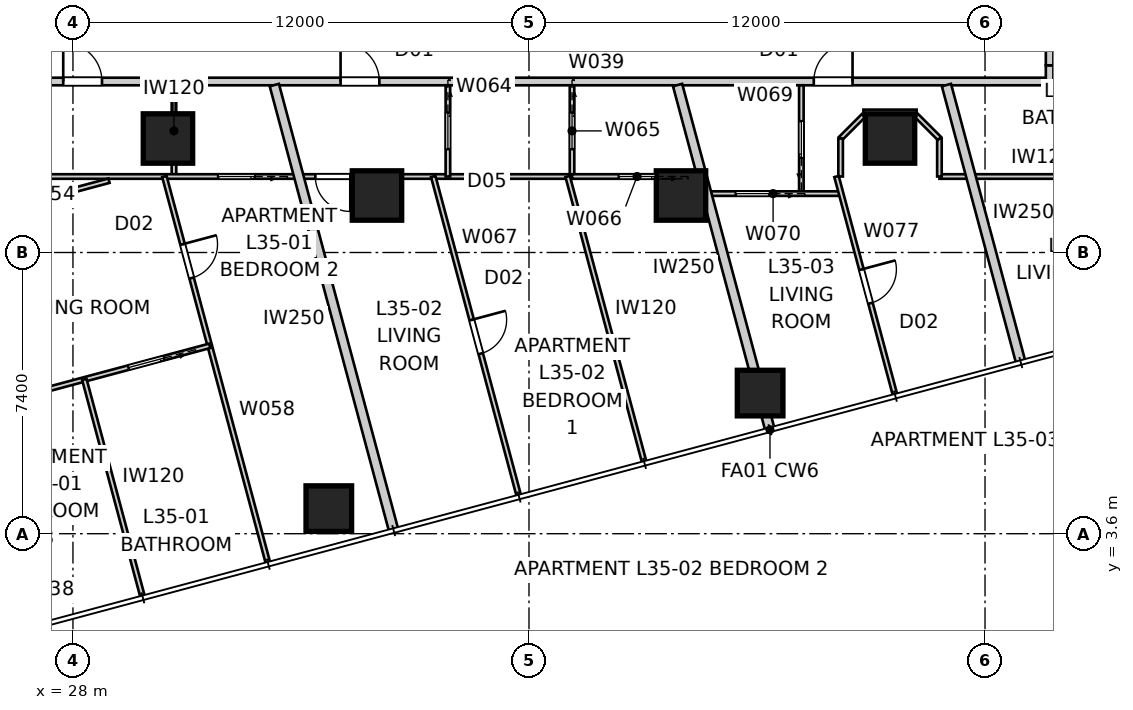
"""IFC4 building model, lengths in metres.
Left out: names, types, materials, properties, quantities, classifications, styles, units other than length and angle.
Written with IfcOpenShell. Run it as: python <this file> out.ifc"""

import sys

from ifc_helpers import new_model, si_unit, direction, frame, frame_2d, origin, origin_2d, place, context, subcontext, project, spatial, rectangle, extrude, element, fill, save


model = new_model("IFC4")
c1 = context("Model", 3, precision=1e-05, world=origin(), true_north=direction((0.0, 1.0)))
c2 = subcontext(c1, "Body", "Model", "MODEL_VIEW")
j1 = project(units=[si_unit("LENGTHUNIT", "METRE"), si_unit("PLANEANGLEUNIT", "RADIAN")], contexts=[c1])
p1 = place(None, origin())
s1 = spatial("IfcSite", under=j1, at=p1, CompositionType="ELEMENT")
p2 = place(p1, origin())
s2 = spatial("IfcBuilding", under=s1, at=p2, CompositionType="ELEMENT")
p3 = place(p2, frame((0.0, 0.0, 128.6)))
s3 = spatial("IfcBuildingStorey", under=s2, at=p3, CompositionType="ELEMENT", Elevation=128.6)
for number, where, z_axis, x_axis in (
    (1, (34.733, 4.26, 0.0), (0.0, 0.0, 1.0), (1.0, 0.0, 0.0)),
    (2, (46.082, 7.301, 0.0), (0.0, 0.0, 1.0), (1.0, 0.0, 0.0)),
):
    element("IfcColumn", number, at=place(p3, frame(where, z_axis=z_axis, x_axis=x_axis)), inside=s3, PredefinedType="COLUMN", context=c2, shape_type="SweptSolid", body=[
        extrude(rectangle(XDim=1.2, YDim=1.2, at=origin_2d()), origin(), (0.0, 0.0, 1.0), 3.4),
    ])
for number, where, z_axis, x_axis in (
    (3, (30.5, 14.0, 0.0), (0.0, 0.0, 1.0), (1.0, 0.0, 0.0)),
    (4, (36.0, 12.5, 0.0), (0.0, 0.0, 1.0), (1.0, 0.0, 0.0)),
    (5, (44.0, 12.5, 0.0), (0.0, 0.0, 1.0), (1.0, 0.0, 0.0)),
    (6, (49.5, 14.0, 0.0), (0.0, 0.0, 1.0), (1.0, 0.0, 0.0)),
):
    element("IfcColumn", number, at=place(p3, frame(where, z_axis=z_axis, x_axis=x_axis)), inside=s3, PredefinedType="COLUMN", context=c2, shape_type="SweptSolid", body=[
        extrude(rectangle(XDim=1.3, YDim=1.3, at=origin_2d()), origin(), (0.0, 0.0, 1.0), 3.4),
    ])
p4 = place(p3, frame((25.5, 15.5, 0.0), z_axis=(0.0, 0.0, 1.0), x_axis=(1.0, 0.0, 0.0)))
e7 = element("IfcWall", 7, at=p4, inside=s3, PredefinedType="PARTITIONING", context=c2, shape_type="SweptSolid", body=[
    extrude(rectangle(XDim=28.2, YDim=0.2, at=frame_2d((14.1, 0.0))), origin(), (0.0, 0.0, 1.0), 3.25),
])
p5 = place(p4, frame((2.244, 0.0, 0.0)))
e8 = element("IfcOpeningElement", 8, at=p5, cuts=e7, PredefinedType="OPENING", context=c2, shape_type="SweptSolid", body=[
    extrude(rectangle(XDim=1.02, YDim=2.1, at=frame_2d((0.51, 1.05))), frame((0.0, 0.11, 0.0), z_axis=(0.0, -1.0, 0.0), x_axis=(1.0, 0.0, 0.0)), (0.0, 0.0, 1.0), 0.22),
])
p6 = place(p4, frame((9.542, 0.0, 0.0)))
e9 = element("IfcOpeningElement", 9, at=p6, cuts=e7, PredefinedType="OPENING", context=c2, shape_type="SweptSolid", body=[
    extrude(rectangle(XDim=1.02, YDim=2.34, at=frame_2d((0.51, 1.17))), frame((0.0, 0.11, 0.0), z_axis=(0.0, -1.0, 0.0), x_axis=(1.0, 0.0, 0.0)), (0.0, 0.0, 1.0), 0.22),
])
p7 = place(p4, frame((21.994, 0.0, 0.0)))
e10 = element("IfcOpeningElement", 10, at=p7, cuts=e7, PredefinedType="OPENING", context=c2, shape_type="SweptSolid", body=[
    extrude(rectangle(XDim=1.02, YDim=2.34, at=frame_2d((0.51, 1.17))), frame((0.0, 0.11, 0.0), z_axis=(0.0, -1.0, 0.0), x_axis=(1.0, 0.0, 0.0)), (0.0, 0.0, 1.0), 0.22),
])
p8 = place(p3, frame((53.7, 15.5, 0.0), z_axis=(0.0, 0.0, 1.0), x_axis=(0.0, 1.0, 0.0)))
e11 = element("IfcWall", 11, at=p8, inside=s3, PredefinedType="PARTITIONING", context=c2, shape_type="SweptSolid", body=[
    extrude(rectangle(XDim=0.426, YDim=0.2, at=frame_2d((0.213, 0.0))), origin(), (0.0, 0.0, 1.0), 3.25),
])
p9 = place(p3, frame((53.7, 15.926, 0.0), z_axis=(0.0, 0.0, 1.0), x_axis=(0.0, 1.0, 0.0)))
e12 = element("IfcWall", 12, at=p9, inside=s3, PredefinedType="PARTITIONING", context=c2, shape_type="SweptSolid", body=[
    extrude(rectangle(XDim=1.554, YDim=0.2, at=frame_2d((0.777, 0.0))), origin(), (0.0, 0.0, 1.0), 2.722),
])
p10 = place(p3, frame((36.44, 3.682, 0.0), z_axis=(0.0, 0.0, 1.0), x_axis=(-0.258824223352, 0.965924438766, 0.0)))
e13 = element("IfcWall", 13, at=p10, inside=s3, PredefinedType="PARTITIONING", context=c2, shape_type="SweptSolid", body=[
    extrude(rectangle(XDim=12.138, YDim=0.25, at=frame_2d((6.069, 0.0))), origin(), (0.0, 0.0, 1.0), 3.25),
])
p11 = place(p3, frame((46.341, 6.335, 0.0), z_axis=(0.0, 0.0, 1.0), x_axis=(-0.258814481793, 0.965927049013, 0.0)))
e14 = element("IfcWall", 14, at=p11, inside=s3, PredefinedType="PARTITIONING", context=c2, shape_type="SweptSolid", body=[
    extrude(rectangle(XDim=9.392, YDim=0.25, at=frame_2d((4.696, 0.0))), origin(), (0.0, 0.0, 1.0), 3.25),
])
p12 = place(p3, frame((52.942, 8.104, 0.0), z_axis=(0.0, 0.0, 1.0), x_axis=(-0.258822171171, 0.965924988656, 0.0)))
e15 = element("IfcWall", 15, at=p12, inside=s3, PredefinedType="PARTITIONING", context=c2, shape_type="SweptSolid", body=[
    extrude(rectangle(XDim=7.56, YDim=0.25, at=frame_2d((3.78, 0.0))), origin(), (0.0, 0.0, 1.0), 3.25),
])
p13 = place(p3, frame((30.658, 15.4, 0.0), z_axis=(0.0, 0.0, 1.0), x_axis=(0.0, -1.0, 0.0)))
e16 = element("IfcWall", 16, at=p13, inside=s3, PredefinedType="PARTITIONING", context=c2, shape_type="SweptSolid", body=[
    extrude(rectangle(XDim=2.4, YDim=0.12, at=frame_2d((1.2, 0.0))), origin(), (0.0, 0.0, 1.0), 3.25),
])
p14 = place(p3, frame((41.07, 13.0, 0.0), z_axis=(0.0, 0.0, 1.0), x_axis=(-1.0, 0.0, 0.0)))
e17 = element("IfcWall", 17, at=p14, inside=s3, PredefinedType="PARTITIONING", context=c2, shape_type="SweptSolid", body=[
    extrude(rectangle(XDim=15.67, YDim=0.12, at=frame_2d((7.835, 0.0))), origin(), (0.0, 0.0, 1.0), 2.55),
])
p15 = place(p14, frame((5.772, 0.0, 0.0)))
e18 = element("IfcOpeningElement", 18, at=p15, cuts=e17, PredefinedType="OPENING", context=c2, shape_type="SweptSolid", body=[
    extrude(rectangle(XDim=0.92, YDim=2.34, at=frame_2d((0.46, 1.17))), frame((0.0, 0.07, 0.0), z_axis=(0.0, -1.0, 0.0), x_axis=(1.0, 0.0, 0.0)), (0.0, 0.0, 1.0), 0.14),
])
p16 = place(p14, frame((8.289, 0.0, 0.0)))
e19 = element("IfcOpeningElement", 19, at=p16, cuts=e17, PredefinedType="OPENING", context=c2, shape_type="SweptSolid", body=[
    extrude(rectangle(XDim=0.96, YDim=2.1, at=frame_2d((0.48, 1.05))), frame((0.0, 0.07, 0.0), z_axis=(0.0, -1.0, 0.0), x_axis=(1.0, 0.0, 0.0)), (0.0, 0.0, 1.0), 0.14),
])
p17 = place(p3, frame((30.406, 13.0, 0.0), z_axis=(0.0, 0.0, 1.0), x_axis=(0.258819200315, -0.9659257847, 0.0)))
e20 = element("IfcWall", 20, at=p17, inside=s3, PredefinedType="PARTITIONING", context=c2, shape_type="SweptSolid", body=[
    extrude(rectangle(XDim=10.522, YDim=0.12, at=frame_2d((5.261, 0.0))), origin(), (0.0, 0.0, 1.0), 2.722),
])
p18 = place(p17, frame((1.846, 0.0, 0.0)))
e21 = element("IfcOpeningElement", 21, at=p18, cuts=e20, PredefinedType="OPENING", context=c2, shape_type="SweptSolid", body=[
    extrude(rectangle(XDim=0.92, YDim=2.34, at=frame_2d((0.46, 1.17))), frame((0.0, 0.07, 0.0), z_axis=(0.0, -1.0, 0.0), x_axis=(1.0, 0.0, 0.0)), (0.0, 0.0, 1.0), 0.14),
])
p19 = place(p3, frame((31.6, 8.544, 0.0), z_axis=(0.0, 0.0, 1.0), x_axis=(-0.965927151587, -0.258814098973, 0.0)))
e22 = element("IfcWall", 22, at=p19, inside=s3, PredefinedType="PARTITIONING", context=c2, shape_type="SweptSolid", body=[
    extrude(rectangle(XDim=10.793, YDim=0.12, at=frame_2d((5.396, 0.0))), origin(), (0.0, 0.0, 1.0), 3.25),
])
p20 = place(p19, frame((6.64, 0.0, 0.0)))
e23 = element("IfcOpeningElement", 23, at=p20, cuts=e22, PredefinedType="OPENING", context=c2, shape_type="SweptSolid", body=[
    extrude(rectangle(XDim=0.92, YDim=2.34, at=frame_2d((0.46, 1.17))), frame((0.0, 0.07, 0.0), z_axis=(0.0, -1.0, 0.0), x_axis=(1.0, 0.0, 0.0)), (0.0, 0.0, 1.0), 0.14),
])
p21 = place(p19, frame((1.253, 0.0, 0.0)))
e24 = element("IfcOpeningElement", 24, at=p21, cuts=e22, PredefinedType="OPENING", context=c2, shape_type="SweptSolid", body=[
    extrude(rectangle(XDim=0.96, YDim=2.1, at=frame_2d((0.48, 1.05))), frame((0.0, 0.07, 0.0), z_axis=(0.0, -1.0, 0.0), x_axis=(1.0, 0.0, 0.0)), (0.0, 0.0, 1.0), 0.14),
])
p22 = place(p3, frame((19.911, 10.468, 0.0), z_axis=(0.0, 0.0, 1.0), x_axis=(0.965927203676, 0.25881390457, 0.0)))
e25 = element("IfcWall", 25, at=p22, inside=s3, PredefinedType="PARTITIONING", context=c2, shape_type="SweptSolid", body=[
    extrude(rectangle(XDim=9.357, YDim=0.12, at=frame_2d((4.678, 0.0))), origin(), (0.0, 0.0, 1.0), 2.638),
])
p23 = place(p22, frame((4.411, 0.0, 0.0)))
e26 = element("IfcOpeningElement", 26, at=p23, cuts=e25, PredefinedType="OPENING", context=c2, shape_type="SweptSolid", body=[
    extrude(rectangle(XDim=0.92, YDim=2.34, at=frame_2d((0.46, 1.17))), frame((0.0, 0.07, 0.0), z_axis=(0.0, -1.0, 0.0), x_axis=(1.0, 0.0, 0.0)), (0.0, 0.0, 1.0), 0.14),
])
p24 = place(p3, frame((28.3, 7.66, 0.0), z_axis=(0.0, 0.0, 1.0), x_axis=(0.25882212607, -0.965925000741, 0.0)))
e27 = element("IfcWall", 27, at=p24, inside=s3, PredefinedType="PARTITIONING", context=c2, shape_type="SweptSolid", body=[
    extrude(rectangle(XDim=5.91, YDim=0.12, at=frame_2d((2.955, 0.0))), origin(), (0.0, 0.0, 1.0), 3.25),
])
p25 = place(p3, frame((37.866, 15.4, 0.0), z_axis=(0.0, 0.0, 1.0), x_axis=(0.0, -1.0, 0.0)))
e28 = element("IfcWall", 28, at=p25, inside=s3, PredefinedType="PARTITIONING", context=c2, shape_type="SweptSolid", body=[
    extrude(rectangle(XDim=2.4, YDim=0.12, at=frame_2d((1.2, 0.0))), origin(), (0.0, 0.0, 1.0), 3.25),
])
p26 = place(p25, frame((0.72, 0.0, 0.0)))
e29 = element("IfcOpeningElement", 29, at=p26, cuts=e28, PredefinedType="OPENING", context=c2, shape_type="SweptSolid", body=[
    extrude(rectangle(XDim=0.96, YDim=2.1, at=frame_2d((0.48, 1.05))), frame((0.0, 0.07, 0.0), z_axis=(0.0, -1.0, 0.0), x_axis=(1.0, 0.0, 0.0)), (0.0, 0.0, 1.0), 0.14),
])
p27 = place(p3, frame((41.132, 15.4, 0.0), z_axis=(0.0, 0.0, 1.0), x_axis=(0.0, -1.0, 0.0)))
e30 = element("IfcWall", 30, at=p27, inside=s3, PredefinedType="PARTITIONING", context=c2, shape_type="SweptSolid", body=[
    extrude(rectangle(XDim=2.4, YDim=0.12, at=frame_2d((1.2, 0.0))), origin(), (0.0, 0.0, 1.0), 3.25),
])
p28 = place(p27, frame((0.72, 0.0, 0.0)))
e31 = element("IfcOpeningElement", 31, at=p28, cuts=e30, PredefinedType="OPENING", context=c2, shape_type="SweptSolid", body=[
    extrude(rectangle(XDim=0.96, YDim=2.1, at=frame_2d((0.48, 1.05))), frame((0.0, 0.07, 0.0), z_axis=(0.0, -1.0, 0.0), x_axis=(1.0, 0.0, 0.0)), (0.0, 0.0, 1.0), 0.14),
])
p29 = place(p3, frame((44.555, 13.0, 0.0), z_axis=(0.0, 0.0, 1.0), x_axis=(-1.0, 0.0, 0.0)))
e32 = element("IfcWall", 32, at=p29, inside=s3, PredefinedType="PARTITIONING", context=c2, shape_type="SweptSolid", body=[
    extrude(rectangle(XDim=3.423, YDim=0.12, at=frame_2d((1.711, 0.0))), origin(), (0.0, 0.0, 1.0), 3.25),
])
p30 = place(p29, frame((1.231, 0.0, 0.0)))
e33 = element("IfcOpeningElement", 33, at=p30, cuts=e32, PredefinedType="OPENING", context=c2, shape_type="SweptSolid", body=[
    extrude(rectangle(XDim=0.96, YDim=2.1, at=frame_2d((0.48, 1.05))), frame((0.0, 0.07, 0.0), z_axis=(0.0, -1.0, 0.0), x_axis=(1.0, 0.0, 0.0)), (0.0, 0.0, 1.0), 0.14),
])
p31 = place(p3, frame((37.481, 13.0, 0.0), z_axis=(0.0, 0.0, 1.0), x_axis=(0.258819860698, -0.965925607751, 0.0)))
e34 = element("IfcWall", 34, at=p31, inside=s3, PredefinedType="PARTITIONING", context=c2, shape_type="SweptSolid", body=[
    extrude(rectangle(XDim=8.691, YDim=0.12, at=frame_2d((4.346, 0.0))), origin(), (0.0, 0.0, 1.0), 3.25),
])
p32 = place(p31, frame((3.906, 0.0, 0.0)))
e35 = element("IfcOpeningElement", 35, at=p32, cuts=e34, PredefinedType="OPENING", context=c2, shape_type="SweptSolid", body=[
    extrude(rectangle(XDim=0.92, YDim=2.34, at=frame_2d((0.46, 1.17))), frame((0.0, 0.07, 0.0), z_axis=(0.0, -1.0, 0.0), x_axis=(1.0, 0.0, 0.0)), (0.0, 0.0, 1.0), 0.14),
])
p33 = place(p3, frame((41.018, 13.0, 0.0), z_axis=(0.0, 0.0, 1.0), x_axis=(0.258813509689, -0.965927309482, 0.0)))
e36 = element("IfcWall", 36, at=p33, inside=s3, PredefinedType="PARTITIONING", context=c2, shape_type="SweptSolid", body=[
    extrude(rectangle(XDim=7.776, YDim=0.12, at=frame_2d((3.888, 0.0))), origin(), (0.0, 0.0, 1.0), 3.25),
])
p34 = place(p3, frame((47.167, 12.55, 0.0), z_axis=(0.0, 0.0, 1.0), x_axis=(0.0, 1.0, 0.0)))
e37 = element("IfcWall", 37, at=p34, inside=s3, PredefinedType="PARTITIONING", context=c2, shape_type="SweptSolid", body=[
    extrude(rectangle(XDim=2.85, YDim=0.12, at=frame_2d((1.425, 0.0))), origin(), (0.0, 0.0, 1.0), 3.25),
])
p35 = place(p34, frame((0.945, 0.0, 0.0)))
e38 = element("IfcOpeningElement", 38, at=p35, cuts=e37, PredefinedType="OPENING", context=c2, shape_type="SweptSolid", body=[
    extrude(rectangle(XDim=0.96, YDim=2.1, at=frame_2d((0.48, 1.05))), frame((0.0, 0.07, 0.0), z_axis=(0.0, -1.0, 0.0), x_axis=(1.0, 0.0, 0.0)), (0.0, 0.0, 1.0), 0.14),
])
p36 = place(p3, frame((48.171, 12.55, 0.0), z_axis=(0.0, 0.0, 1.0), x_axis=(-1.0, 0.0, 0.0)))
e39 = element("IfcWall", 39, at=p36, inside=s3, PredefinedType="PARTITIONING", context=c2, shape_type="SweptSolid", body=[
    extrude(rectangle(XDim=3.495, YDim=0.12, at=frame_2d((1.748, 0.0))), origin(), (0.0, 0.0, 1.0), 3.25),
])
p37 = place(p36, frame((1.77, 0.0, 0.0)))
e40 = element("IfcOpeningElement", 40, at=p37, cuts=e39, PredefinedType="OPENING", context=c2, shape_type="SweptSolid", body=[
    extrude(rectangle(XDim=0.96, YDim=2.1, at=frame_2d((0.48, 1.05))), frame((0.0, 0.07, 0.0), z_axis=(0.0, -1.0, 0.0), x_axis=(1.0, 0.0, 0.0)), (0.0, 0.0, 1.0), 0.14),
])
p38 = place(p3, frame((56.2, 13.0, 0.0), z_axis=(0.0, 0.0, 1.0), x_axis=(-1.0, 0.0, 0.0)))
e41 = element("IfcWall", 41, at=p38, inside=s3, PredefinedType="PARTITIONING", context=c2, shape_type="SweptSolid", body=[
    extrude(rectangle(XDim=5.4, YDim=0.12, at=frame_2d((2.7, 0.0))), origin(), (0.0, 0.0, 1.0), 3.25),
])
p39 = place(p3, frame((50.8, 13.0, 0.0), z_axis=(0.0, 0.0, 1.0), x_axis=(0.0, 1.0, 0.0)))
e42 = element("IfcWall", 42, at=p39, inside=s3, PredefinedType="PARTITIONING", context=c2, shape_type="SweptSolid", body=[
    extrude(rectangle(XDim=1.0, YDim=0.12, at=frame_2d((0.5, 0.0))), origin(), (0.0, 0.0, 1.0), 3.25),
])
p40 = place(p3, frame((50.8, 14.0, 0.0), z_axis=(0.0, 0.0, 1.0), x_axis=(-0.707106781187, 0.707106781187, 0.0)))
e43 = element("IfcWall", 43, at=p40, inside=s3, PredefinedType="PARTITIONING", context=c2, shape_type="SweptSolid", body=[
    extrude(rectangle(XDim=0.849, YDim=0.12, at=frame_2d((0.424, 0.0))), origin(), (0.0, 0.0, 1.0), 3.25),
])
p41 = place(p3, frame((50.2, 14.7, 0.0), z_axis=(0.0, 0.0, 1.0), x_axis=(-1.0, 0.0, 0.0)))
e44 = element("IfcWall", 44, at=p41, inside=s3, PredefinedType="PARTITIONING", context=c2, shape_type="SweptSolid", body=[
    extrude(rectangle(XDim=1.4, YDim=0.12, at=frame_2d((0.7, 0.0))), origin(), (0.0, 0.0, 1.0), 3.25),
])
p42 = place(p3, frame((48.8, 14.6, 0.0), z_axis=(0.0, 0.0, 1.0), x_axis=(-0.707106781187, -0.707106781187, 0.0)))
e45 = element("IfcWall", 45, at=p42, inside=s3, PredefinedType="PARTITIONING", context=c2, shape_type="SweptSolid", body=[
    extrude(rectangle(XDim=0.849, YDim=0.12, at=frame_2d((0.424, 0.0))), origin(), (0.0, 0.0, 1.0), 3.25),
])
p43 = place(p3, frame((48.2, 14.0, 0.0), z_axis=(0.0, 0.0, 1.0), x_axis=(0.0, -1.0, 0.0)))
e46 = element("IfcWall", 46, at=p43, inside=s3, PredefinedType="PARTITIONING", context=c2, shape_type="SweptSolid", body=[
    extrude(rectangle(XDim=1.0, YDim=0.12, at=frame_2d((0.5, 0.0))), origin(), (0.0, 0.0, 1.0), 3.25),
])
p44 = place(p3, frame((48.092, 13.0, 0.0), z_axis=(0.0, 0.0, 1.0), x_axis=(0.258812722515, -0.965927520399, 0.0)))
e47 = element("IfcWall", 47, at=p44, inside=s3, PredefinedType="PARTITIONING", context=c2, shape_type="SweptSolid", body=[
    extrude(rectangle(XDim=5.945, YDim=0.12, at=frame_2d((2.972, 0.0))), origin(), (0.0, 0.0, 1.0), 3.25),
])
p45 = place(p44, frame((2.532, 0.0, 0.0)))
e48 = element("IfcOpeningElement", 48, at=p45, cuts=e47, PredefinedType="OPENING", context=c2, shape_type="SweptSolid", body=[
    extrude(rectangle(XDim=0.92, YDim=2.34, at=frame_2d((0.46, 1.17))), frame((0.0, 0.07, 0.0), z_axis=(0.0, -1.0, 0.0), x_axis=(1.0, 0.0, 0.0)), (0.0, 0.0, 1.0), 0.14),
])
p46 = place(p5, origin())
e49 = element("IfcDoor", 49, at=p46, inside=s3, OperationType="SINGLE_SWING_LEFT", PredefinedType="DOOR", context=c2, shape_type="SweptSolid", body=[
    extrude(rectangle(XDim=1.02, YDim=2.1, at=frame_2d((0.51, 1.05))), frame((0.0, 0.025, 0.0), z_axis=(0.0, -1.0, 0.0), x_axis=(1.0, 0.0, 0.0)), (0.0, 0.0, 1.0), 0.05),
])
fill(e8, e49)
p47 = place(p6, origin())
e50 = element("IfcDoor", 50, at=p47, inside=s3, OperationType="SINGLE_SWING_LEFT", PredefinedType="DOOR", context=c2, shape_type="SweptSolid", body=[
    extrude(rectangle(XDim=1.02, YDim=2.34, at=frame_2d((0.51, 1.17))), frame((0.0, 0.025, 0.0), z_axis=(0.0, -1.0, 0.0), x_axis=(1.0, 0.0, 0.0)), (0.0, 0.0, 1.0), 0.05),
])
fill(e9, e50)
p48 = place(p7, origin())
e51 = element("IfcDoor", 51, at=p48, inside=s3, OperationType="SINGLE_SWING_RIGHT", PredefinedType="DOOR", context=c2, shape_type="SweptSolid", body=[
    extrude(rectangle(XDim=1.02, YDim=2.34, at=frame_2d((0.51, 1.17))), frame((0.0, 0.025, 0.0), z_axis=(0.0, -1.0, 0.0), x_axis=(1.0, 0.0, 0.0)), (0.0, 0.0, 1.0), 0.05),
])
fill(e10, e51)
p49 = place(p15, origin())
e52 = element("IfcDoor", 52, at=p49, inside=s3, OperationType="SINGLE_SWING_LEFT", PredefinedType="DOOR", context=c2, shape_type="SweptSolid", body=[
    extrude(rectangle(XDim=0.92, YDim=2.34, at=frame_2d((0.46, 1.17))), frame((0.0, 0.025, 0.0), z_axis=(0.0, -1.0, 0.0), x_axis=(1.0, 0.0, 0.0)), (0.0, 0.0, 1.0), 0.05),
])
fill(e18, e52)
p50 = place(p26, origin())
e53 = element("IfcDoor", 53, at=p50, inside=s3, OperationType="SLIDING_TO_LEFT", PredefinedType="DOOR", context=c2, shape_type="SweptSolid", body=[
    extrude(rectangle(XDim=0.96, YDim=2.1, at=frame_2d((0.48, 1.05))), frame((0.0, 0.025, 0.0), z_axis=(0.0, -1.0, 0.0), x_axis=(1.0, 0.0, 0.0)), (0.0, 0.0, 1.0), 0.05),
])
fill(e29, e53)
p51 = place(p35, origin())
e54 = element("IfcDoor", 54, at=p51, inside=s3, OperationType="SLIDING_TO_LEFT", PredefinedType="DOOR", context=c2, shape_type="SweptSolid", body=[
    extrude(rectangle(XDim=0.96, YDim=2.1, at=frame_2d((0.48, 1.05))), frame((0.0, 0.025, 0.0), z_axis=(0.0, -1.0, 0.0), x_axis=(1.0, 0.0, 0.0)), (0.0, 0.0, 1.0), 0.05),
])
fill(e38, e54)
p52 = place(p32, origin())
e55 = element("IfcDoor", 55, at=p52, inside=s3, OperationType="SINGLE_SWING_LEFT", PredefinedType="DOOR", context=c2, shape_type="SweptSolid", body=[
    extrude(rectangle(XDim=0.92, YDim=2.34, at=frame_2d((0.46, 1.17))), frame((0.0, 0.025, 0.0), z_axis=(0.0, -1.0, 0.0), x_axis=(1.0, 0.0, 0.0)), (0.0, 0.0, 1.0), 0.05),
])
fill(e35, e55)
p53 = place(p28, origin())
e56 = element("IfcDoor", 56, at=p53, inside=s3, OperationType="SLIDING_TO_LEFT", PredefinedType="DOOR", context=c2, shape_type="SweptSolid", body=[
    extrude(rectangle(XDim=0.96, YDim=2.1, at=frame_2d((0.48, 1.05))), frame((0.0, 0.025, 0.0), z_axis=(0.0, -1.0, 0.0), x_axis=(1.0, 0.0, 0.0)), (0.0, 0.0, 1.0), 0.05),
])
fill(e31, e56)
p54 = place(p37, origin())
e57 = element("IfcDoor", 57, at=p54, inside=s3, OperationType="SLIDING_TO_LEFT", PredefinedType="DOOR", context=c2, shape_type="SweptSolid", body=[
    extrude(rectangle(XDim=0.96, YDim=2.1, at=frame_2d((0.48, 1.05))), frame((0.0, 0.025, 0.0), z_axis=(0.0, -1.0, 0.0), x_axis=(1.0, 0.0, 0.0)), (0.0, 0.0, 1.0), 0.05),
])
fill(e40, e57)
p55 = place(p18, origin())
e58 = element("IfcDoor", 58, at=p55, inside=s3, OperationType="SINGLE_SWING_LEFT", PredefinedType="DOOR", context=c2, shape_type="SweptSolid", body=[
    extrude(rectangle(XDim=0.92, YDim=2.34, at=frame_2d((0.46, 1.17))), frame((0.0, 0.025, 0.0), z_axis=(0.0, -1.0, 0.0), x_axis=(1.0, 0.0, 0.0)), (0.0, 0.0, 1.0), 0.05),
])
fill(e21, e58)
p56 = place(p21, origin())
e59 = element("IfcDoor", 59, at=p56, inside=s3, OperationType="SLIDING_TO_LEFT", PredefinedType="DOOR", context=c2, shape_type="SweptSolid", body=[
    extrude(rectangle(XDim=0.96, YDim=2.1, at=frame_2d((0.48, 1.05))), frame((0.0, 0.025, 0.0), z_axis=(0.0, -1.0, 0.0), x_axis=(1.0, 0.0, 0.0)), (0.0, 0.0, 1.0), 0.05),
])
fill(e24, e59)
p57 = place(p30, origin())
e60 = element("IfcDoor", 60, at=p57, inside=s3, OperationType="SLIDING_TO_LEFT", PredefinedType="DOOR", context=c2, shape_type="SweptSolid", body=[
    extrude(rectangle(XDim=0.96, YDim=2.1, at=frame_2d((0.48, 1.05))), frame((0.0, 0.025, 0.0), z_axis=(0.0, -1.0, 0.0), x_axis=(1.0, 0.0, 0.0)), (0.0, 0.0, 1.0), 0.05),
])
fill(e33, e60)
p58 = place(p45, origin())
e61 = element("IfcDoor", 61, at=p58, inside=s3, OperationType="SINGLE_SWING_LEFT", PredefinedType="DOOR", context=c2, shape_type="SweptSolid", body=[
    extrude(rectangle(XDim=0.92, YDim=2.34, at=frame_2d((0.46, 1.17))), frame((0.0, 0.025, 0.0), z_axis=(0.0, -1.0, 0.0), x_axis=(1.0, 0.0, 0.0)), (0.0, 0.0, 1.0), 0.05),
])
fill(e48, e61)
p59 = place(p16, origin())
e62 = element("IfcDoor", 62, at=p59, inside=s3, OperationType="SLIDING_TO_LEFT", PredefinedType="DOOR", context=c2, shape_type="SweptSolid", body=[
    extrude(rectangle(XDim=0.96, YDim=2.1, at=frame_2d((0.48, 1.05))), frame((0.0, 0.025, 0.0), z_axis=(0.0, -1.0, 0.0), x_axis=(1.0, 0.0, 0.0)), (0.0, 0.0, 1.0), 0.05),
])
fill(e19, e62)
save(model, sys.argv[1])
